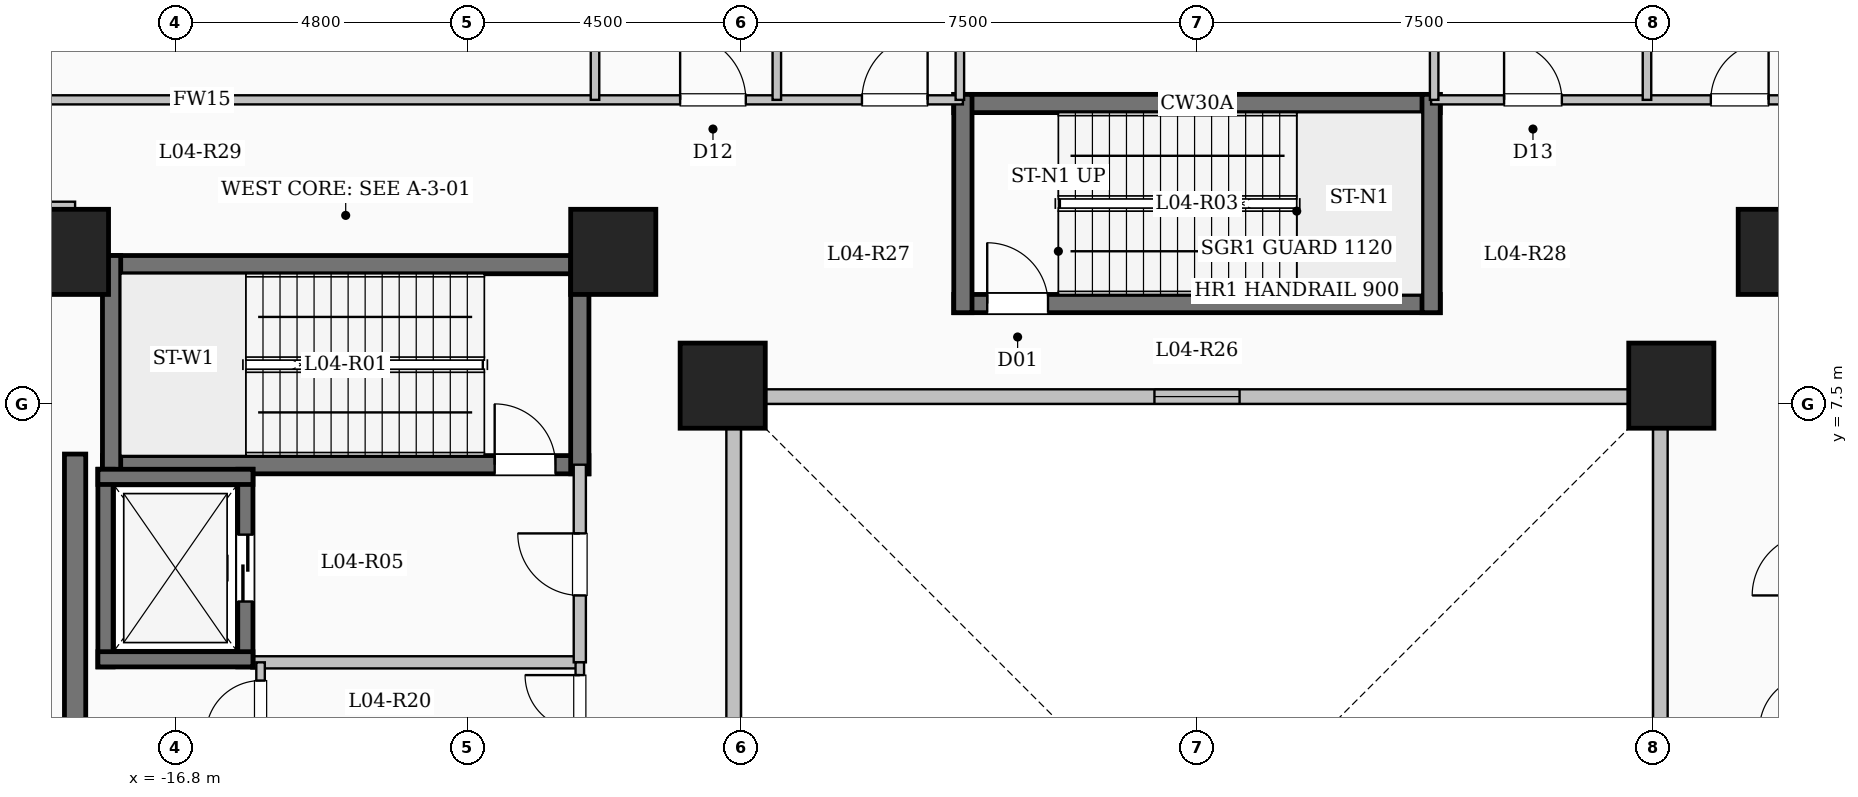
"""IFC4 building model, lengths in metres.
Left out: names, types, materials, properties, quantities, classifications, styles, units other than length and angle.
Written with IfcOpenShell. Run it as: python <this file> out.ifc"""

import sys

from ifc_helpers import new_model, si_unit, direction, frame, frame_2d, origin, origin_2d, place, context, subcontext, project, spatial, rectangle, extrude, element, fill, save


model = new_model("IFC4")
c1 = context("Model", 3, precision=1e-05, world=origin(), true_north=direction((0.0, 1.0)))
c2 = subcontext(c1, "Body", "Model", "MODEL_VIEW")
j1 = project(units=[si_unit("LENGTHUNIT", "METRE"), si_unit("PLANEANGLEUNIT", "RADIAN")], contexts=[c1])
p1 = place(None, origin())
s1 = spatial("IfcSite", under=j1, at=p1, CompositionType="ELEMENT")
p2 = place(p1, origin())
s2 = spatial("IfcBuilding", under=s1, at=p2, CompositionType="ELEMENT")
p3 = place(p2, frame((0.0, 0.0, 18.9)))
s3 = spatial("IfcBuildingStorey", under=s2, at=p3, CompositionType="ELEMENT", Elevation=18.9)
for number, where, z_axis, x_axis in (
    (1, (-7.8, 7.8, 0.0), (0.0, 0.0, 1.0), (1.0, 0.0, 0.0)),
    (2, (7.8, 7.8, 0.0), (0.0, 0.0, 1.0), (1.0, 0.0, 0.0)),
    (3, (-9.6, 10.0, 0.0), (0.0, 0.0, 1.0), (1.0, 0.0, 0.0)),
    (4, (9.6, 10.0, 0.0), (0.0, 0.0, 1.0), (1.0, 0.0, 0.0)),
    (5, (-18.6, 10.0, 0.0), (0.0, 0.0, 1.0), (1.0, 0.0, 0.0)),
):
    element("IfcColumn", number, at=place(p3, frame(where, z_axis=z_axis, x_axis=x_axis)), inside=s3, PredefinedType="COLUMN", context=c2, shape_type="SweptSolid", body=[
        extrude(rectangle(XDim=1.4, YDim=1.4, at=origin_2d()), origin(), (0.0, 0.0, 1.0), 5.1),
    ])
p4 = place(p3, frame((7.62, -7.62, 0.0), z_axis=(0.0, 0.0, 1.0), x_axis=(0.0, 1.0, 0.0)))
e6 = element("IfcWall", 6, at=p4, inside=s3, PredefinedType="SOLIDWALL", context=c2, shape_type="SweptSolid", body=[
    extrude(rectangle(XDim=15.24, YDim=0.24, at=frame_2d((7.62, 0.0))), origin(), (0.0, 0.0, 1.0), 4.85),
])
p5 = place(p4, frame((6.92, 0.0, 0.95)))
e7 = element("IfcOpeningElement", 7, at=p5, cuts=e6, PredefinedType="OPENING", context=c2, shape_type="SweptSolid", body=[
    extrude(rectangle(XDim=1.4, YDim=1.5, at=frame_2d((0.7, 0.75))), frame((0.0, 0.13, 0.0), z_axis=(0.0, -1.0, 0.0), x_axis=(1.0, 0.0, 0.0)), (0.0, 0.0, 1.0), 0.26),
])
p6 = place(p3, frame((7.62, 7.62, 0.0), z_axis=(0.0, 0.0, 1.0), x_axis=(-1.0, 0.0, 0.0)))
e8 = element("IfcWall", 8, at=p6, inside=s3, PredefinedType="SOLIDWALL", context=c2, shape_type="SweptSolid", body=[
    extrude(rectangle(XDim=15.24, YDim=0.24, at=frame_2d((7.62, 0.0))), origin(), (0.0, 0.0, 1.0), 4.85),
])
p7 = place(p6, frame((6.92, 0.0, 0.95)))
e9 = element("IfcOpeningElement", 9, at=p7, cuts=e8, PredefinedType="OPENING", context=c2, shape_type="SweptSolid", body=[
    extrude(rectangle(XDim=1.4, YDim=1.5, at=frame_2d((0.7, 0.75))), frame((0.0, 0.13, 0.0), z_axis=(0.0, -1.0, 0.0), x_axis=(1.0, 0.0, 0.0)), (0.0, 0.0, 1.0), 0.26),
])
p8 = place(p3, frame((-7.62, 7.62, 0.0), z_axis=(0.0, 0.0, 1.0), x_axis=(0.0, -1.0, 0.0)))
e10 = element("IfcWall", 10, at=p8, inside=s3, PredefinedType="SOLIDWALL", context=c2, shape_type="SweptSolid", body=[
    extrude(rectangle(XDim=15.24, YDim=0.24, at=frame_2d((7.62, 0.0))), origin(), (0.0, 0.0, 1.0), 4.85),
])
p9 = place(p8, frame((6.92, 0.0, 0.95)))
e11 = element("IfcOpeningElement", 11, at=p9, cuts=e10, PredefinedType="OPENING", context=c2, shape_type="SweptSolid", body=[
    extrude(rectangle(XDim=1.4, YDim=1.5, at=frame_2d((0.7, 0.75))), frame((0.0, 0.13, 0.0), z_axis=(0.0, -1.0, 0.0), x_axis=(1.0, 0.0, 0.0)), (0.0, 0.0, 1.0), 0.26),
])
p10 = place(p3, frame((-18.0, 9.79, 0.0), z_axis=(0.0, 0.0, 1.0), x_axis=(1.0, 0.0, 0.0)))
e12 = element("IfcWall", 12, at=p10, inside=s3, PredefinedType="SHEAR", context=c2, shape_type="SweptSolid", body=[
    extrude(rectangle(XDim=8.0, YDim=0.3, at=frame_2d((4.0, 0.0))), origin(), (0.0, 0.0, 1.0), 5.1),
])
p11 = place(p3, frame((-18.0, 6.5, 0.0), z_axis=(0.0, 0.0, 1.0), x_axis=(1.0, 0.0, 0.0)))
e13 = element("IfcWall", 13, at=p11, inside=s3, PredefinedType="SHEAR", context=c2, shape_type="SweptSolid", body=[
    extrude(rectangle(XDim=8.0, YDim=0.3, at=frame_2d((4.0, 0.0))), origin(), (0.0, 0.0, 1.0), 5.1),
])
p12 = place(p11, frame((6.45, 0.0, 0.0)))
e14 = element("IfcOpeningElement", 14, at=p12, cuts=e13, PredefinedType="OPENING", context=c2, shape_type="SweptSolid", body=[
    extrude(rectangle(XDim=1.0, YDim=2.15, at=frame_2d((0.5, 1.075))), frame((0.0, 0.16, 0.0), z_axis=(0.0, -1.0, 0.0), x_axis=(1.0, 0.0, 0.0)), (0.0, 0.0, 1.0), 0.32),
])
for number, where, z_axis, x_axis in (
    (15, (-17.85, 6.35, 0.0), (0.0, 0.0, 1.0), (0.0, 1.0, 0.0)),
    (16, (-10.15, 6.35, 0.0), (0.0, 0.0, 1.0), (0.0, 1.0, 0.0)),
):
    element("IfcWall", number, at=place(p3, frame(where, z_axis=z_axis, x_axis=x_axis)), inside=s3, PredefinedType="SHEAR", context=c2, shape_type="SweptSolid", body=[
        extrude(rectangle(XDim=3.59, YDim=0.3, at=frame_2d((1.795, 0.0))), origin(), (0.0, 0.0, 1.0), 5.1),
    ])
p13 = place(p3, frame((-4.0, 12.44, 0.0), z_axis=(0.0, 0.0, 1.0), x_axis=(1.0, 0.0, 0.0)))
e17 = element("IfcWall", 17, at=p13, inside=s3, PredefinedType="SHEAR", context=c2, shape_type="SweptSolid", body=[
    extrude(rectangle(XDim=8.0, YDim=0.3, at=frame_2d((4.0, 0.0))), origin(), (0.0, 0.0, 1.0), 5.1),
])
p14 = place(p3, frame((-4.0, 9.15, 0.0), z_axis=(0.0, 0.0, 1.0), x_axis=(1.0, 0.0, 0.0)))
e18 = element("IfcWall", 18, at=p14, inside=s3, PredefinedType="SHEAR", context=c2, shape_type="SweptSolid", body=[
    extrude(rectangle(XDim=8.0, YDim=0.3, at=frame_2d((4.0, 0.0))), origin(), (0.0, 0.0, 1.0), 5.1),
])
p15 = place(p14, frame((0.55, 0.0, 0.0)))
e19 = element("IfcOpeningElement", 19, at=p15, cuts=e18, PredefinedType="OPENING", context=c2, shape_type="SweptSolid", body=[
    extrude(rectangle(XDim=1.0, YDim=2.15, at=frame_2d((0.5, 1.075))), frame((0.0, 0.16, 0.0), z_axis=(0.0, -1.0, 0.0), x_axis=(1.0, 0.0, 0.0)), (0.0, 0.0, 1.0), 0.32),
])
for number, where, z_axis, x_axis in (
    (20, (-3.85, 9.0, 0.0), (0.0, 0.0, 1.0), (0.0, 1.0, 0.0)),
    (21, (3.85, 9.0, 0.0), (0.0, 0.0, 1.0), (0.0, 1.0, 0.0)),
):
    element("IfcWall", number, at=place(p3, frame(where, z_axis=z_axis, x_axis=x_axis)), inside=s3, PredefinedType="SHEAR", context=c2, shape_type="SweptSolid", body=[
        extrude(rectangle(XDim=3.59, YDim=0.3, at=frame_2d((1.795, 0.0))), origin(), (0.0, 0.0, 1.0), 5.1),
    ])
p16 = place(p3, frame((-15.55, 3.25, 0.0), z_axis=(0.0, 0.0, 1.0), x_axis=(1.0, 0.0, 0.0)))
e22 = element("IfcWall", 22, at=p16, inside=s3, PredefinedType="SOLIDWALL", context=c2, shape_type="SweptSolid", body=[
    extrude(rectangle(XDim=5.4, YDim=0.2, at=frame_2d((2.7, 0.0))), origin(), (0.0, 0.0, 1.0), 4.85),
])
p17 = place(p3, frame((-10.15, 3.25, 0.0), z_axis=(0.0, 0.0, 1.0), x_axis=(0.0, 1.0, 0.0)))
e23 = element("IfcWall", 23, at=p17, inside=s3, PredefinedType="SOLIDWALL", context=c2, shape_type="SweptSolid", body=[
    extrude(rectangle(XDim=3.25, YDim=0.2, at=frame_2d((1.625, 0.0))), origin(), (0.0, 0.0, 1.0), 4.85),
])
p18 = place(p17, frame((1.1, 0.0, 0.0)))
e24 = element("IfcOpeningElement", 24, at=p18, cuts=e23, PredefinedType="OPENING", context=c2, shape_type="SweptSolid", body=[
    extrude(rectangle(XDim=1.02, YDim=2.15, at=frame_2d((0.51, 1.075))), frame((0.0, 0.11, 0.0), z_axis=(0.0, -1.0, 0.0), x_axis=(1.0, 0.0, 0.0)), (0.0, 0.0, 1.0), 0.22),
])
p19 = place(p3, frame((-17.95, 3.175, 0.0), z_axis=(0.0, 0.0, 1.0), x_axis=(0.0, 1.0, 0.0)))
e25 = element("IfcWall", 25, at=p19, inside=s3, PredefinedType="SHEAR", context=c2, shape_type="SweptSolid", body=[
    extrude(rectangle(XDim=3.25, YDim=0.25, at=frame_2d((1.625, 0.0))), origin(), (0.0, 0.0, 1.0), 5.1),
])
p20 = place(p3, frame((-15.65, 3.175, 0.0), z_axis=(0.0, 0.0, 1.0), x_axis=(0.0, 1.0, 0.0)))
e26 = element("IfcWall", 26, at=p20, inside=s3, PredefinedType="SHEAR", context=c2, shape_type="SweptSolid", body=[
    extrude(rectangle(XDim=3.25, YDim=0.25, at=frame_2d((1.625, 0.0))), origin(), (0.0, 0.0, 1.0), 5.1),
])
p21 = place(p20, frame((1.075, 0.0, 0.0)))
e27 = element("IfcOpeningElement", 27, at=p21, cuts=e26, PredefinedType="OPENING", context=c2, shape_type="SweptSolid", body=[
    extrude(rectangle(XDim=1.1, YDim=2.15, at=frame_2d((0.55, 1.075))), frame((0.0, 0.135, 0.0), z_axis=(0.0, -1.0, 0.0), x_axis=(1.0, 0.0, 0.0)), (0.0, 0.0, 1.0), 0.27),
])
for number, where, z_axis, x_axis in (
    (28, (-18.075, 3.3, 0.0), (0.0, 0.0, 1.0), (1.0, 0.0, 0.0)),
    (29, (-18.075, 6.3, 0.0), (0.0, 0.0, 1.0), (1.0, 0.0, 0.0)),
):
    element("IfcWall", number, at=place(p3, frame(where, z_axis=z_axis, x_axis=x_axis)), inside=s3, PredefinedType="SHEAR", context=c2, shape_type="SweptSolid", body=[
        extrude(rectangle(XDim=2.55, YDim=0.25, at=frame_2d((1.275, 0.0))), origin(), (0.0, 0.0, 1.0), 5.1),
    ])
p22 = place(p3, frame((-18.45, -7.375, 0.0), z_axis=(0.0, 0.0, 1.0), x_axis=(0.0, 1.0, 0.0)))
e30 = element("IfcWall", 30, at=p22, inside=s3, PredefinedType="SHEAR", context=c2, shape_type="SweptSolid", body=[
    extrude(rectangle(XDim=14.05, YDim=0.35, at=frame_2d((7.025, 0.0))), origin(), (0.0, 0.0, 1.0), 5.1),
])
p23 = place(p3, frame((-10.15, 1.92, 0.0), z_axis=(0.0, 0.0, 1.0), x_axis=(0.0, 1.0, 0.0)))
e31 = element("IfcWall", 31, at=p23, inside=s3, PredefinedType="PARTITIONING", context=c2, shape_type="SweptSolid", body=[
    extrude(rectangle(XDim=1.33, YDim=0.14, at=frame_2d((0.665, 0.0))), origin(), (0.0, 0.0, 1.0), 4.85),
])
p24 = place(p23, frame((0.22, 0.0, 0.0)))
e32 = element("IfcOpeningElement", 32, at=p24, cuts=e31, PredefinedType="OPENING", context=c2, shape_type="SweptSolid", body=[
    extrude(rectangle(XDim=0.9, YDim=2.08, at=frame_2d((0.45, 1.04))), frame((0.0, 0.08, 0.0), z_axis=(0.0, -1.0, 0.0), x_axis=(1.0, 0.0, 0.0)), (0.0, 0.0, 1.0), 0.16),
])
p25 = place(p3, frame((-15.4, -7.2, 0.0), z_axis=(0.0, 0.0, 1.0), x_axis=(0.0, 1.0, 0.0)))
e33 = element("IfcWall", 33, at=p25, inside=s3, PredefinedType="PARTITIONING", context=c2, shape_type="SweptSolid", body=[
    extrude(rectangle(XDim=10.45, YDim=0.14, at=frame_2d((5.225, 0.0))), origin(), (0.0, 0.0, 1.0), 4.85),
])
p26 = place(p25, frame((9.25, 0.0, 0.0)))
e34 = element("IfcOpeningElement", 34, at=p26, cuts=e33, PredefinedType="OPENING", context=c2, shape_type="SweptSolid", body=[
    extrude(rectangle(XDim=0.9, YDim=2.08, at=frame_2d((0.45, 1.04))), frame((0.0, 0.08, 0.0), z_axis=(0.0, -1.0, 0.0), x_axis=(1.0, 0.0, 0.0)), (0.0, 0.0, 1.0), 0.16),
])
p27 = place(p3, frame((-28.88, 12.5, 0.0), z_axis=(0.0, 0.0, 1.0), x_axis=(1.0, 0.0, 0.0)))
e35 = element("IfcWall", 35, at=p27, inside=s3, PredefinedType="PARTITIONING", context=c2, shape_type="SweptSolid", body=[
    extrude(rectangle(XDim=25.03, YDim=0.15, at=frame_2d((12.515, 0.0))), origin(), (0.0, 0.0, 1.0), 4.85),
])
p28 = place(p27, frame((2.5, 0.0, 0.0)))
e36 = element("IfcOpeningElement", 36, at=p28, cuts=e35, PredefinedType="OPENING", context=c2, shape_type="SweptSolid", body=[
    extrude(rectangle(XDim=1.2, YDim=2.15, at=frame_2d((0.6, 1.075))), frame((0.0, 0.085, 0.0), z_axis=(0.0, -1.0, 0.0), x_axis=(1.0, 0.0, 0.0)), (0.0, 0.0, 1.0), 0.17),
])
p29 = place(p27, frame((20.38, 0.0, 0.0)))
e37 = element("IfcOpeningElement", 37, at=p29, cuts=e35, PredefinedType="OPENING", context=c2, shape_type="SweptSolid", body=[
    extrude(rectangle(XDim=1.08, YDim=2.15, at=frame_2d((0.54, 1.075))), frame((0.0, 0.085, 0.0), z_axis=(0.0, -1.0, 0.0), x_axis=(1.0, 0.0, 0.0)), (0.0, 0.0, 1.0), 0.17),
])
p30 = place(p27, frame((23.37, 0.0, 0.0)))
e38 = element("IfcOpeningElement", 38, at=p30, cuts=e35, PredefinedType="OPENING", context=c2, shape_type="SweptSolid", body=[
    extrude(rectangle(XDim=1.08, YDim=2.15, at=frame_2d((0.54, 1.075))), frame((0.0, 0.085, 0.0), z_axis=(0.0, -1.0, 0.0), x_axis=(1.0, 0.0, 0.0)), (0.0, 0.0, 1.0), 0.17),
])
p31 = place(p3, frame((3.85, 12.5, 0.0), z_axis=(0.0, 0.0, 1.0), x_axis=(1.0, 0.0, 0.0)))
e39 = element("IfcWall", 39, at=p31, inside=s3, PredefinedType="PARTITIONING", context=c2, shape_type="SweptSolid", body=[
    extrude(rectangle(XDim=25.03, YDim=0.15, at=frame_2d((12.515, 0.0))), origin(), (0.0, 0.0, 1.0), 4.85),
])
p32 = place(p31, frame((1.2, 0.0, 0.0)))
e40 = element("IfcOpeningElement", 40, at=p32, cuts=e39, PredefinedType="OPENING", context=c2, shape_type="SweptSolid", body=[
    extrude(rectangle(XDim=0.95, YDim=2.15, at=frame_2d((0.475, 1.075))), frame((0.0, 0.085, 0.0), z_axis=(0.0, -1.0, 0.0), x_axis=(1.0, 0.0, 0.0)), (0.0, 0.0, 1.0), 0.17),
])
p33 = place(p31, frame((4.6, 0.0, 0.0)))
e41 = element("IfcOpeningElement", 41, at=p33, cuts=e39, PredefinedType="OPENING", context=c2, shape_type="SweptSolid", body=[
    extrude(rectangle(XDim=0.95, YDim=2.15, at=frame_2d((0.475, 1.075))), frame((0.0, 0.085, 0.0), z_axis=(0.0, -1.0, 0.0), x_axis=(1.0, 0.0, 0.0)), (0.0, 0.0, 1.0), 0.17),
])
p34 = place(p31, frame((9.1, 0.0, 0.0)))
e42 = element("IfcOpeningElement", 42, at=p34, cuts=e39, PredefinedType="OPENING", context=c2, shape_type="SweptSolid", body=[
    extrude(rectangle(XDim=0.95, YDim=2.15, at=frame_2d((0.475, 1.075))), frame((0.0, 0.085, 0.0), z_axis=(0.0, -1.0, 0.0), x_axis=(1.0, 0.0, 0.0)), (0.0, 0.0, 1.0), 0.17),
])
p35 = place(p31, frame((18.4, 0.0, 0.0)))
e43 = element("IfcOpeningElement", 43, at=p35, cuts=e39, PredefinedType="OPENING", context=c2, shape_type="SweptSolid", body=[
    extrude(rectangle(XDim=1.08, YDim=2.15, at=frame_2d((0.54, 1.075))), frame((0.0, 0.085, 0.0), z_axis=(0.0, -1.0, 0.0), x_axis=(1.0, 0.0, 0.0)), (0.0, 0.0, 1.0), 0.17),
])
p36 = place(p31, frame((21.48, 0.0, 0.0)))
e44 = element("IfcOpeningElement", 44, at=p36, cuts=e39, PredefinedType="OPENING", context=c2, shape_type="SweptSolid", body=[
    extrude(rectangle(XDim=1.08, YDim=2.15, at=frame_2d((0.54, 1.075))), frame((0.0, 0.085, 0.0), z_axis=(0.0, -1.0, 0.0), x_axis=(1.0, 0.0, 0.0)), (0.0, 0.0, 1.0), 0.17),
])
for number, where, z_axis, x_axis in (
    (45, (-3.9, 12.5, 0.0), (0.0, 0.0, 1.0), (0.0, 1.0, 0.0)),
    (46, (3.9, 12.5, 0.0), (0.0, 0.0, 1.0), (0.0, 1.0, 0.0)),
    (47, (-9.9, 12.5, 0.0), (0.0, 0.0, 1.0), (0.0, 1.0, 0.0)),
    (48, (-6.91, 12.5, 0.0), (0.0, 0.0, 1.0), (0.0, 1.0, 0.0)),
    (49, (7.4, 12.5, 0.0), (0.0, 0.0, 1.0), (0.0, 1.0, 0.0)),
):
    element("IfcWall", number, at=place(p3, frame(where, z_axis=z_axis, x_axis=x_axis)), inside=s3, PredefinedType="PARTITIONING", context=c2, shape_type="SweptSolid", body=[
        extrude(rectangle(XDim=13.78, YDim=0.14, at=frame_2d((6.89, 0.0))), origin(), (0.0, 0.0, 1.0), 4.85),
    ])
p37 = place(p3, frame((-28.88, 10.75, 0.0), z_axis=(0.0, 0.0, 1.0), x_axis=(1.0, 0.0, 0.0)))
e50 = element("IfcWall", 50, at=p37, inside=s3, PredefinedType="PARTITIONING", context=c2, shape_type="SweptSolid", body=[
    extrude(rectangle(XDim=10.43, YDim=0.15, at=frame_2d((5.215, 0.0))), origin(), (0.0, 0.0, 1.0), 4.85),
])
p38 = place(p7, origin())
e51 = element("IfcWindow", 51, at=p38, inside=s3, PartitioningType="SINGLE_PANEL", PredefinedType="WINDOW", context=c2, shape_type="SweptSolid", body=[
    extrude(rectangle(XDim=1.4, YDim=1.5, at=frame_2d((0.7, 0.75))), frame((0.0, 0.03, 0.0), z_axis=(0.0, -1.0, 0.0), x_axis=(1.0, 0.0, 0.0)), (0.0, 0.0, 1.0), 0.06),
])
fill(e9, e51)
p39 = place(p12, origin())
e52 = element("IfcDoor", 52, at=p39, inside=s3, OperationType="SINGLE_SWING_LEFT", PredefinedType="DOOR", context=c2, shape_type="SweptSolid", body=[
    extrude(rectangle(XDim=1.0, YDim=2.15, at=frame_2d((0.5, 1.075))), frame((0.0, 0.025, 0.0), z_axis=(0.0, -1.0, 0.0), x_axis=(1.0, 0.0, 0.0)), (0.0, 0.0, 1.0), 0.05),
])
fill(e14, e52)
p40 = place(p15, origin())
e53 = element("IfcDoor", 53, at=p40, inside=s3, OperationType="SINGLE_SWING_LEFT", PredefinedType="DOOR", context=c2, shape_type="SweptSolid", body=[
    extrude(rectangle(XDim=1.0, YDim=2.15, at=frame_2d((0.5, 1.075))), frame((0.0, 0.025, 0.0), z_axis=(0.0, -1.0, 0.0), x_axis=(1.0, 0.0, 0.0)), (0.0, 0.0, 1.0), 0.05),
])
fill(e19, e53)
p41 = place(p18, origin())
e54 = element("IfcDoor", 54, at=p41, inside=s3, OperationType="SINGLE_SWING_RIGHT", PredefinedType="DOOR", context=c2, shape_type="SweptSolid", body=[
    extrude(rectangle(XDim=1.02, YDim=2.15, at=frame_2d((0.51, 1.075))), frame((0.0, 0.025, 0.0), z_axis=(0.0, -1.0, 0.0), x_axis=(1.0, 0.0, 0.0)), (0.0, 0.0, 1.0), 0.05),
])
fill(e24, e54)
p42 = place(p21, origin())
e55 = element("IfcDoor", 55, at=p42, inside=s3, OperationType="SLIDING_TO_LEFT", PredefinedType="DOOR", context=c2, shape_type="SweptSolid", body=[
    extrude(rectangle(XDim=1.1, YDim=2.15, at=frame_2d((0.55, 1.075))), frame((0.0, 0.025, 0.0), z_axis=(0.0, -1.0, 0.0), x_axis=(1.0, 0.0, 0.0)), (0.0, 0.0, 1.0), 0.05),
])
fill(e27, e55)
p43 = place(p24, origin())
e56 = element("IfcDoor", 56, at=p43, inside=s3, OperationType="SINGLE_SWING_RIGHT", PredefinedType="DOOR", context=c2, shape_type="SweptSolid", body=[
    extrude(rectangle(XDim=0.9, YDim=2.08, at=frame_2d((0.45, 1.04))), frame((0.0, 0.025, 0.0), z_axis=(0.0, -1.0, 0.0), x_axis=(1.0, 0.0, 0.0)), (0.0, 0.0, 1.0), 0.05),
])
fill(e32, e56)
p44 = place(p26, origin())
e57 = element("IfcDoor", 57, at=p44, inside=s3, OperationType="SINGLE_SWING_LEFT", PredefinedType="DOOR", context=c2, shape_type="SweptSolid", body=[
    extrude(rectangle(XDim=0.9, YDim=2.08, at=frame_2d((0.45, 1.04))), frame((0.0, 0.025, 0.0), z_axis=(0.0, -1.0, 0.0), x_axis=(1.0, 0.0, 0.0)), (0.0, 0.0, 1.0), 0.05),
])
fill(e34, e57)
p45 = place(p29, origin())
e58 = element("IfcDoor", 58, at=p45, inside=s3, OperationType="SINGLE_SWING_LEFT", PredefinedType="DOOR", context=c2, shape_type="SweptSolid", body=[
    extrude(rectangle(XDim=1.08, YDim=2.15, at=frame_2d((0.54, 1.075))), frame((0.0, 0.025, 0.0), z_axis=(0.0, -1.0, 0.0), x_axis=(1.0, 0.0, 0.0)), (0.0, 0.0, 1.0), 0.05),
])
fill(e37, e58)
p46 = place(p30, origin())
e59 = element("IfcDoor", 59, at=p46, inside=s3, OperationType="SINGLE_SWING_RIGHT", PredefinedType="DOOR", context=c2, shape_type="SweptSolid", body=[
    extrude(rectangle(XDim=1.08, YDim=2.15, at=frame_2d((0.54, 1.075))), frame((0.0, 0.025, 0.0), z_axis=(0.0, -1.0, 0.0), x_axis=(1.0, 0.0, 0.0)), (0.0, 0.0, 1.0), 0.05),
])
fill(e38, e59)
p47 = place(p32, origin())
e60 = element("IfcDoor", 60, at=p47, inside=s3, OperationType="SINGLE_SWING_LEFT", PredefinedType="DOOR", context=c2, shape_type="SweptSolid", body=[
    extrude(rectangle(XDim=0.95, YDim=2.15, at=frame_2d((0.475, 1.075))), frame((0.0, 0.025, 0.0), z_axis=(0.0, -1.0, 0.0), x_axis=(1.0, 0.0, 0.0)), (0.0, 0.0, 1.0), 0.05),
])
fill(e40, e60)
p48 = place(p33, origin())
e61 = element("IfcDoor", 61, at=p48, inside=s3, OperationType="SINGLE_SWING_RIGHT", PredefinedType="DOOR", context=c2, shape_type="SweptSolid", body=[
    extrude(rectangle(XDim=0.95, YDim=2.15, at=frame_2d((0.475, 1.075))), frame((0.0, 0.025, 0.0), z_axis=(0.0, -1.0, 0.0), x_axis=(1.0, 0.0, 0.0)), (0.0, 0.0, 1.0), 0.05),
])
fill(e41, e61)
save(model, sys.argv[1])
